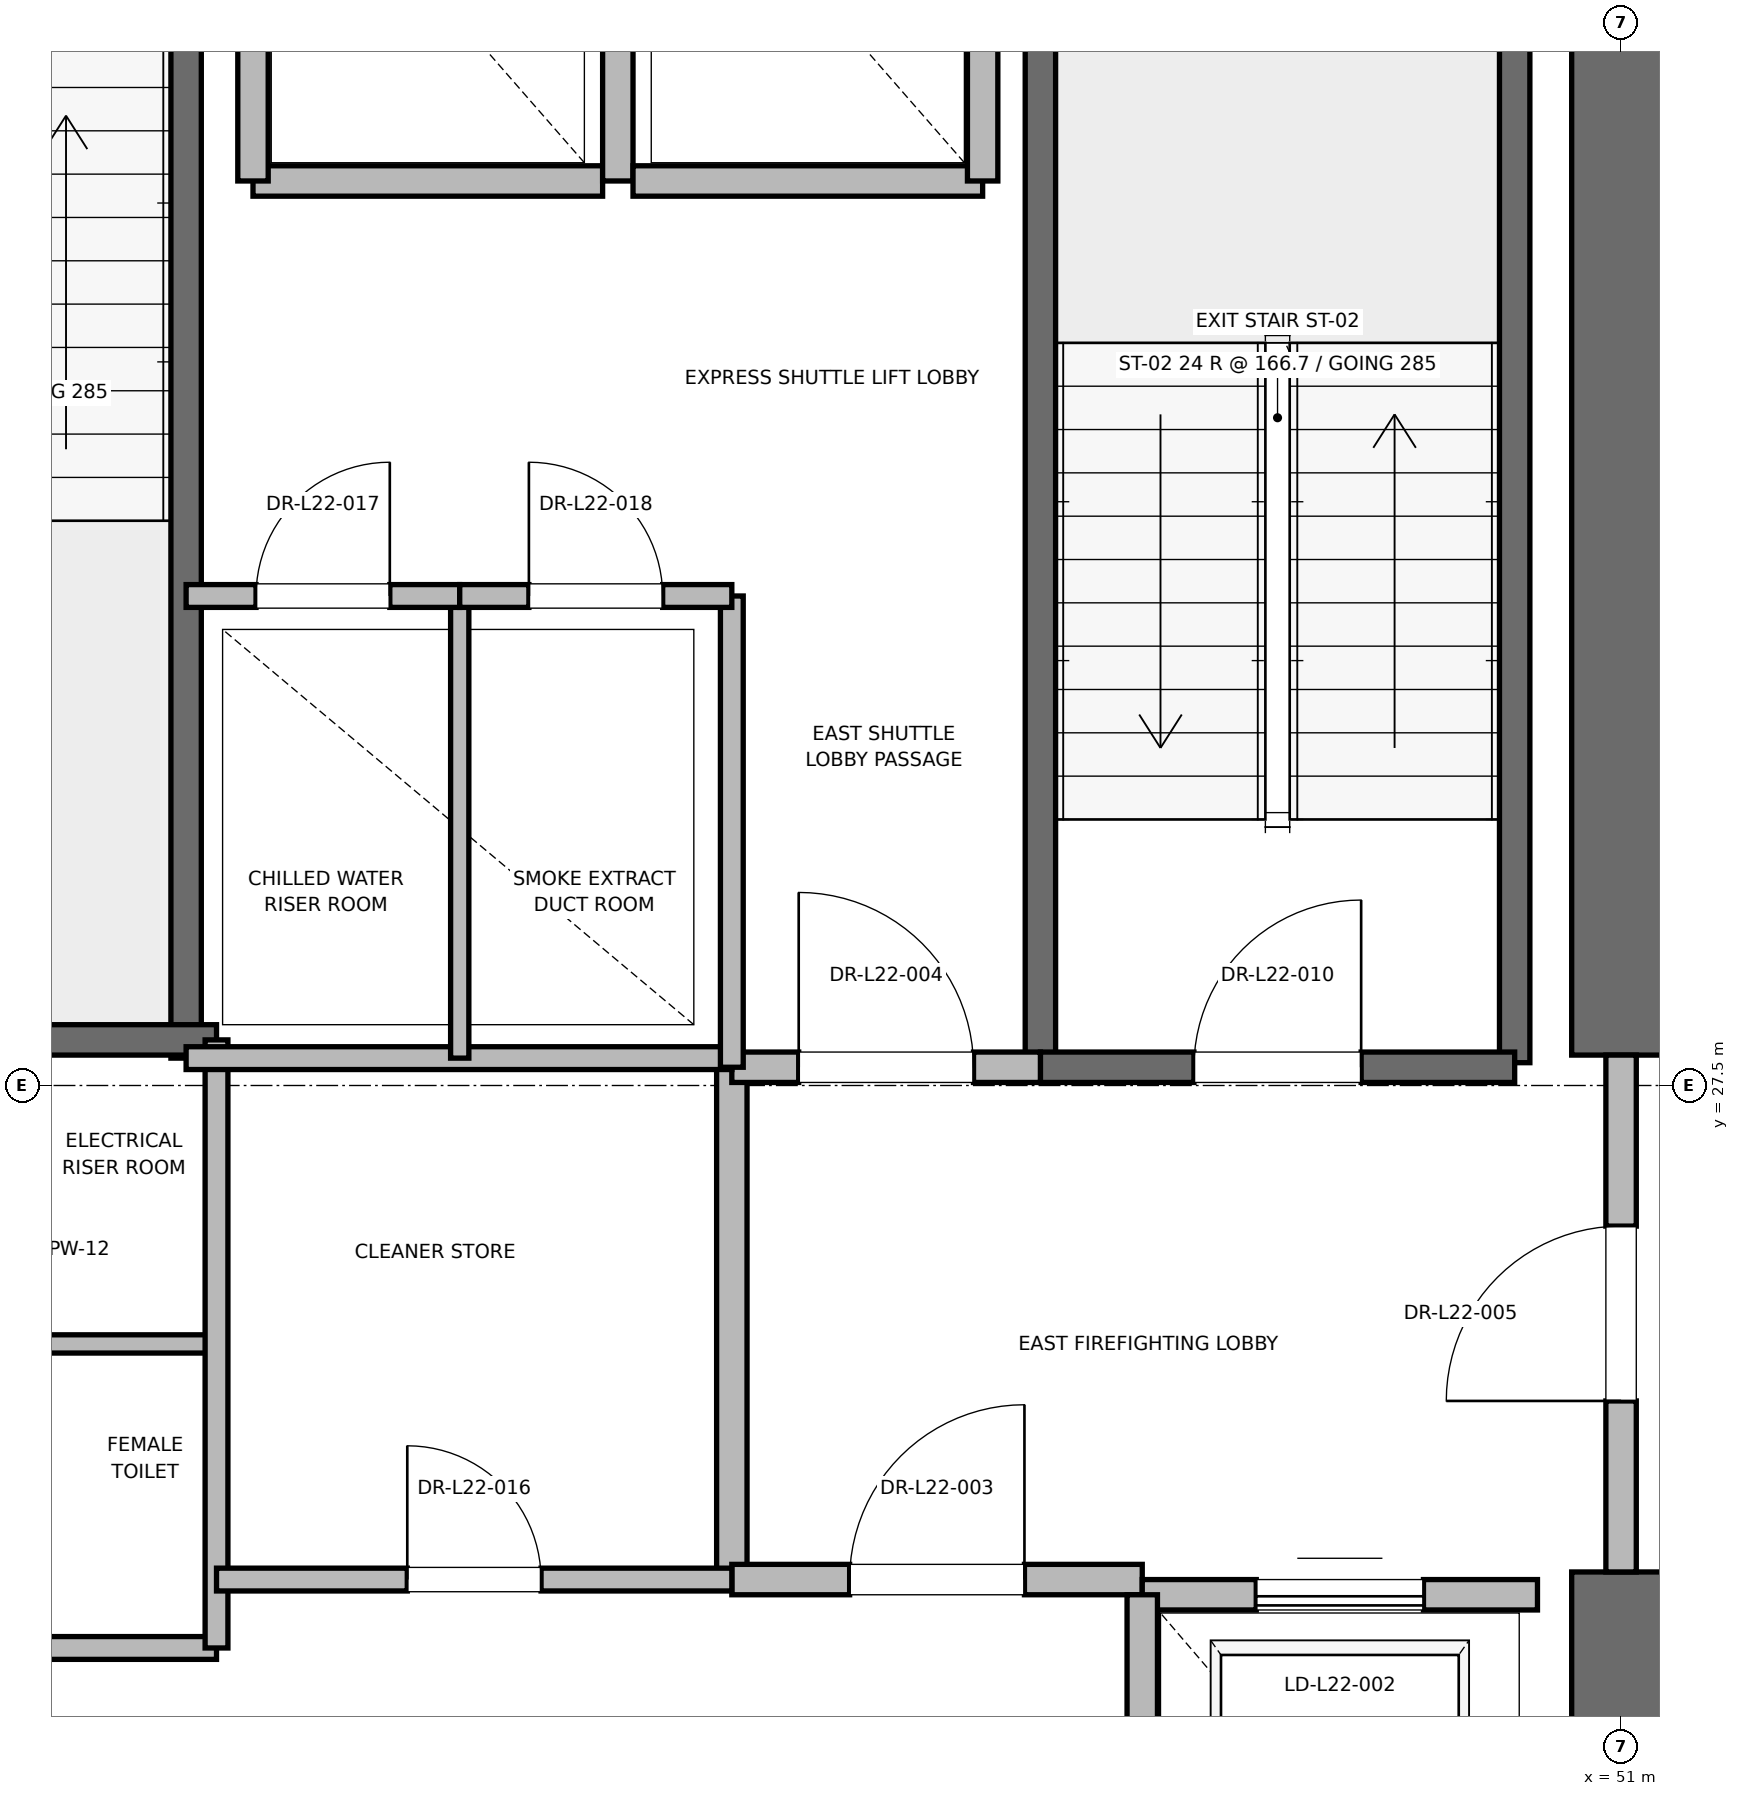
"""IFC4 building model, lengths in metres.
Left out: names, types, materials, properties, quantities, classifications, styles, units other than length and angle.
Written with IfcOpenShell. Run it as: python <this file> out.ifc"""

import sys

from ifc_helpers import new_model, si_unit, direction, frame, frame_2d, origin, place, context, subcontext, project, spatial, rectangle, extrude, element, fill, save


model = new_model("IFC4")
c1 = context("Model", 3, precision=1e-05, world=origin(), true_north=direction((0.0, 1.0)))
c2 = subcontext(c1, "Body", "Model", "MODEL_VIEW")
j1 = project(units=[si_unit("LENGTHUNIT", "METRE"), si_unit("PLANEANGLEUNIT", "RADIAN")], contexts=[c1])
p1 = place(None, origin())
s1 = spatial("IfcSite", under=j1, at=p1, CompositionType="ELEMENT")
p2 = place(p1, origin())
s2 = spatial("IfcBuilding", under=s1, at=p2, CompositionType="ELEMENT")
p3 = place(p2, frame((0.0, 0.0, 95.6)))
s3 = spatial("IfcBuildingStorey", under=s2, at=p3, CompositionType="ELEMENT", Elevation=95.6)
p4 = place(p3, frame((51.0, 18.5, 0.0), z_axis=(0.0, 0.0, 1.0), x_axis=(0.0, 1.0, 0.0)))
e1 = element("IfcWall", 1, at=p4, inside=s3, PredefinedType="SHEAR", context=c2, shape_type="SweptSolid", body=[
    extrude(rectangle(XDim=5.8, YDim=0.65, at=frame_2d((2.9, 0.0))), origin(), (0.0, 0.0, 1.0), 3.76),
])
p5 = place(p3, frame((51.0, 27.7, 0.0), z_axis=(0.0, 0.0, 1.0), x_axis=(0.0, 1.0, 0.0)))
e2 = element("IfcWall", 2, at=p5, inside=s3, PredefinedType="SHEAR", context=c2, shape_type="SweptSolid", body=[
    extrude(rectangle(XDim=8.8, YDim=0.65, at=frame_2d((4.4, 0.0))), origin(), (0.0, 0.0, 1.0), 3.76),
])
p6 = place(p3, frame((50.3, 27.65, 0.0), z_axis=(0.0, 0.0, 1.0), x_axis=(0.0, 1.0, 0.0)))
e3 = element("IfcWall", 3, at=p6, inside=s3, PredefinedType="SOLIDWALL", context=c2, shape_type="SweptSolid", body=[
    extrude(rectangle(XDim=8.15, YDim=0.2, at=frame_2d((4.075, 0.0))), origin(), (0.0, 0.0, 1.0), 3.76),
])
p7 = place(p3, frame((47.18, 27.62, 0.0), z_axis=(0.0, 0.0, 1.0), x_axis=(0.0, 1.0, 0.0)))
e4 = element("IfcWall", 4, at=p7, inside=s3, PredefinedType="SOLIDWALL", context=c2, shape_type="SweptSolid", body=[
    extrude(rectangle(XDim=8.18, YDim=0.2, at=frame_2d((4.09, 0.0))), origin(), (0.0, 0.0, 1.0), 3.76),
])
p8 = place(p3, frame((47.18, 27.62, 0.0), z_axis=(0.0, 0.0, 1.0), x_axis=(1.0, 0.0, 0.0)))
e5 = element("IfcWall", 5, at=p8, inside=s3, PredefinedType="SOLIDWALL", context=c2, shape_type="SweptSolid", body=[
    extrude(rectangle(XDim=3.12, YDim=0.2, at=frame_2d((1.56, 0.0))), origin(), (0.0, 0.0, 1.0), 3.76),
])
p9 = place(p8, frame((1.01, 0.0, 0.0)))
e6 = element("IfcOpeningElement", 6, at=p9, cuts=e5, PredefinedType="OPENING", context=c2, shape_type="SweptSolid", body=[
    extrude(rectangle(XDim=1.1, YDim=2.15, at=frame_2d((0.55, 1.075))), frame((0.0, 0.1, 0.0), z_axis=(0.0, -1.0, 0.0), x_axis=(1.0, 0.0, 0.0)), (0.0, 0.0, 1.0), 0.2),
])
p10 = place(p3, frame((41.56, 27.68, 0.0), z_axis=(0.0, 0.0, 1.0), x_axis=(0.0, 1.0, 0.0)))
e7 = element("IfcWall", 7, at=p10, inside=s3, PredefinedType="SOLIDWALL", context=c2, shape_type="SweptSolid", body=[
    extrude(rectangle(XDim=8.57, YDim=0.2, at=frame_2d((4.285, 0.0))), origin(), (0.0, 0.0, 1.0), 3.76),
])
p11 = place(p3, frame((38.44, 27.8, 0.0), z_axis=(0.0, 0.0, 1.0), x_axis=(1.0, 0.0, 0.0)))
e8 = element("IfcWall", 8, at=p11, inside=s3, PredefinedType="SOLIDWALL", context=c2, shape_type="SweptSolid", body=[
    extrude(rectangle(XDim=3.32, YDim=0.2, at=frame_2d((1.66, 0.0))), origin(), (0.0, 0.0, 1.0), 3.76),
])
p12 = place(p3, frame((45.15, 24.25, 0.0), z_axis=(0.0, 0.0, 1.0), x_axis=(0.0, 1.0, 0.0)))
e9 = element("IfcWall", 9, at=p12, inside=s3, PredefinedType="PARTITIONING", context=c2, shape_type="SweptSolid", body=[
    extrude(rectangle(XDim=3.37, YDim=0.2, at=frame_2d((1.685, 0.0))), origin(), (0.0, 0.0, 1.0), 3.76),
])
p13 = place(p3, frame((45.15, 24.25, 0.0), z_axis=(0.0, 0.0, 1.0), x_axis=(1.0, 0.0, 0.0)))
e10 = element("IfcWall", 10, at=p13, inside=s3, PredefinedType="PARTITIONING", context=c2, shape_type="SweptSolid", body=[
    extrude(rectangle(XDim=2.7, YDim=0.2, at=frame_2d((1.35, 0.0))), origin(), (0.0, 0.0, 1.0), 3.76),
])
p14 = place(p13, frame((0.775, 0.0, 0.0)))
e11 = element("IfcOpeningElement", 11, at=p14, cuts=e10, PredefinedType="OPENING", context=c2, shape_type="SweptSolid", body=[
    extrude(rectangle(XDim=1.15, YDim=2.2, at=frame_2d((0.575, 1.1))), frame((0.0, 0.1, 0.0), z_axis=(0.0, -1.0, 0.0), x_axis=(1.0, 0.0, 0.0)), (0.0, 0.0, 1.0), 0.2),
])
p15 = place(p3, frame((45.15, 27.62, 0.0), z_axis=(0.0, 0.0, 1.0), x_axis=(1.0, 0.0, 0.0)))
e12 = element("IfcWall", 12, at=p15, inside=s3, PredefinedType="PARTITIONING", context=c2, shape_type="SweptSolid", body=[
    extrude(rectangle(XDim=2.03, YDim=0.2, at=frame_2d((1.015, 0.0))), origin(), (0.0, 0.0, 1.0), 3.76),
])
p16 = place(p15, frame((0.44, 0.0, 0.0)))
e13 = element("IfcOpeningElement", 13, at=p16, cuts=e12, PredefinedType="OPENING", context=c2, shape_type="SweptSolid", body=[
    extrude(rectangle(XDim=1.15, YDim=2.2, at=frame_2d((0.575, 1.1))), frame((0.0, 0.1, 0.0), z_axis=(0.0, -1.0, 0.0), x_axis=(1.0, 0.0, 0.0)), (0.0, 0.0, 1.0), 0.2),
])
p17 = place(p3, frame((51.0, 24.3, 0.0), z_axis=(0.0, 0.0, 1.0), x_axis=(0.0, 1.0, 0.0)))
e14 = element("IfcWall", 14, at=p17, inside=s3, PredefinedType="PARTITIONING", context=c2, shape_type="SweptSolid", body=[
    extrude(rectangle(XDim=3.4, YDim=0.2, at=frame_2d((1.7, 0.0))), origin(), (0.0, 0.0, 1.0), 2.54),
])
p18 = place(p17, frame((1.125, 0.0, 0.0)))
e15 = element("IfcOpeningElement", 15, at=p18, cuts=e14, PredefinedType="OPENING", context=c2, shape_type="SweptSolid", body=[
    extrude(rectangle(XDim=1.15, YDim=2.2, at=frame_2d((0.575, 1.1))), frame((0.0, 0.1, 0.0), z_axis=(0.0, -1.0, 0.0), x_axis=(1.0, 0.0, 0.0)), (0.0, 0.0, 1.0), 0.2),
])
p19 = place(p3, frame((50.45, 24.15, 0.0), z_axis=(0.0, 0.0, 1.0), x_axis=(-1.0, 0.0, 0.0)))
e16 = element("IfcWall", 16, at=p19, inside=s3, PredefinedType="SOLIDWALL", context=c2, shape_type="SweptSolid", body=[
    extrude(rectangle(XDim=2.6, YDim=0.2, at=frame_2d((1.3, 0.0))), origin(), (0.0, 0.0, 1.0), 2.54),
])
p20 = place(p19, frame((0.75, 0.0, 0.0)))
e17 = element("IfcOpeningElement", 17, at=p20, cuts=e16, PredefinedType="OPENING", context=c2, shape_type="SweptSolid", body=[
    extrude(rectangle(XDim=1.1, YDim=2.2, at=frame_2d((0.55, 1.1))), frame((0.0, 0.1, 0.0), z_axis=(0.0, -1.0, 0.0), x_axis=(1.0, 0.0, 0.0)), (0.0, 0.0, 1.0), 0.2),
])
p21 = place(p3, frame((47.85, 24.15, 0.0), z_axis=(0.0, 0.0, 1.0), x_axis=(0.0, -1.0, 0.0)))
e18 = element("IfcWall", 18, at=p21, inside=s3, PredefinedType="SOLIDWALL", context=c2, shape_type="SweptSolid", body=[
    extrude(rectangle(XDim=3.0, YDim=0.2, at=frame_2d((1.5, 0.0))), origin(), (0.0, 0.0, 1.0), 3.76),
])
p22 = place(p3, frame((42.0, 33.45, 0.0), z_axis=(0.0, 0.0, 1.0), x_axis=(1.0, 0.0, 0.0)))
e19 = element("IfcWall", 19, at=p22, inside=s3, PredefinedType="SOLIDWALL", context=c2, shape_type="SweptSolid", body=[
    extrude(rectangle(XDim=2.3, YDim=0.2, at=frame_2d((1.15, 0.0))), origin(), (0.0, 0.0, 1.0), 3.76),
])
for number, where, z_axis, x_axis in (
    (20, (42.0, 36.05, 0.0), (0.0, 0.0, 1.0), (0.0, -1.0, 0.0)),
    (21, (44.4, 33.45, 0.0), (0.0, 0.0, 1.0), (0.0, 1.0, 0.0)),
):
    element("IfcWall", number, at=place(p3, frame(where, z_axis=z_axis, x_axis=x_axis)), inside=s3, PredefinedType="SOLIDWALL", context=c2, shape_type="SweptSolid", body=[
        extrude(rectangle(XDim=2.6, YDim=0.2, at=frame_2d((1.3, 0.0))), origin(), (0.0, 0.0, 1.0), 2.54),
    ])
p23 = place(p3, frame((44.5, 33.45, 0.0), z_axis=(0.0, 0.0, 1.0), x_axis=(1.0, 0.0, 0.0)))
e22 = element("IfcWall", 22, at=p23, inside=s3, PredefinedType="SOLIDWALL", context=c2, shape_type="SweptSolid", body=[
    extrude(rectangle(XDim=2.3, YDim=0.2, at=frame_2d((1.15, 0.0))), origin(), (0.0, 0.0, 1.0), 3.76),
])
p24 = place(p3, frame((46.8, 33.45, 0.0), z_axis=(0.0, 0.0, 1.0), x_axis=(0.0, 1.0, 0.0)))
e23 = element("IfcWall", 23, at=p24, inside=s3, PredefinedType="SOLIDWALL", context=c2, shape_type="SweptSolid", body=[
    extrude(rectangle(XDim=2.6, YDim=0.2, at=frame_2d((1.3, 0.0))), origin(), (0.0, 0.0, 1.0), 3.76),
])
p25 = place(p3, frame((39.95, 23.8, 0.0), z_axis=(0.0, 0.0, 1.0), x_axis=(1.0, 0.0, 0.0)))
e24 = element("IfcWall", 24, at=p25, inside=s3, PredefinedType="PARTITIONING", context=c2, shape_type="SweptSolid", body=[
    extrude(rectangle(XDim=1.81, YDim=0.15, at=frame_2d((0.905, 0.0))), origin(), (0.0, 0.0, 1.0), 2.85),
])
p26 = place(p3, frame((39.95, 25.8, 0.0), z_axis=(0.0, 0.0, 1.0), x_axis=(1.0, 0.0, 0.0)))
e25 = element("IfcWall", 25, at=p26, inside=s3, PredefinedType="PARTITIONING", context=c2, shape_type="SweptSolid", body=[
    extrude(rectangle(XDim=1.81, YDim=0.12, at=frame_2d((0.905, 0.0))), origin(), (0.0, 0.0, 1.0), 2.85),
])
p27 = place(p3, frame((41.76, 23.8, 0.0), z_axis=(0.0, 0.0, 1.0), x_axis=(0.0, 1.0, 0.0)))
e26 = element("IfcWall", 26, at=p27, inside=s3, PredefinedType="PARTITIONING", context=c2, shape_type="SweptSolid", body=[
    extrude(rectangle(XDim=4.0, YDim=0.15, at=frame_2d((2.0, 0.0))), origin(), (0.0, 0.0, 1.0), 2.85),
])
p28 = place(p3, frame((41.56, 27.68, 0.0), z_axis=(0.0, 0.0, 1.0), x_axis=(1.0, 0.0, 0.0)))
e27 = element("IfcWall", 27, at=p28, inside=s3, PredefinedType="PARTITIONING", context=c2, shape_type="SweptSolid", body=[
    extrude(rectangle(XDim=3.59, YDim=0.15, at=frame_2d((1.795, 0.0))), origin(), (0.0, 0.0, 1.0), 2.85),
])
p29 = place(p3, frame((41.76, 24.25, 0.0), z_axis=(0.0, 0.0, 1.0), x_axis=(1.0, 0.0, 0.0)))
e28 = element("IfcWall", 28, at=p29, inside=s3, PredefinedType="PARTITIONING", context=c2, shape_type="SweptSolid", body=[
    extrude(rectangle(XDim=3.39, YDim=0.15, at=frame_2d((1.695, 0.0))), origin(), (0.0, 0.0, 1.0), 2.85),
])
p30 = place(p29, frame((1.255, 0.0, 0.0)))
e29 = element("IfcOpeningElement", 29, at=p30, cuts=e28, PredefinedType="OPENING", context=c2, shape_type="SweptSolid", body=[
    extrude(rectangle(XDim=0.88, YDim=2.1, at=frame_2d((0.44, 1.05))), frame((0.0, 0.075, 0.0), z_axis=(0.0, -1.0, 0.0), x_axis=(1.0, 0.0, 0.0)), (0.0, 0.0, 1.0), 0.15),
])
p31 = place(p3, frame((45.15, 27.62, 0.0), z_axis=(0.0, 0.0, 1.0), x_axis=(0.0, 1.0, 0.0)))
e30 = element("IfcWall", 30, at=p31, inside=s3, PredefinedType="PARTITIONING", context=c2, shape_type="SweptSolid", body=[
    extrude(rectangle(XDim=3.1, YDim=0.15, at=frame_2d((1.55, 0.0))), origin(), (0.0, 0.0, 1.0), 2.85),
])
p32 = place(p3, frame((43.36, 27.68, 0.0), z_axis=(0.0, 0.0, 1.0), x_axis=(0.0, 1.0, 0.0)))
e31 = element("IfcWall", 31, at=p32, inside=s3, PredefinedType="PARTITIONING", context=c2, shape_type="SweptSolid", body=[
    extrude(rectangle(XDim=3.04, YDim=0.12, at=frame_2d((1.52, 0.0))), origin(), (0.0, 0.0, 1.0), 2.85),
])
p33 = place(p3, frame((41.56, 30.72, 0.0), z_axis=(0.0, 0.0, 1.0), x_axis=(1.0, 0.0, 0.0)))
e32 = element("IfcWall", 32, at=p33, inside=s3, PredefinedType="PARTITIONING", context=c2, shape_type="SweptSolid", body=[
    extrude(rectangle(XDim=1.8, YDim=0.15, at=frame_2d((0.9, 0.0))), origin(), (0.0, 0.0, 1.0), 2.85),
])
p34 = place(p33, frame((0.46, 0.0, 0.0)))
e33 = element("IfcOpeningElement", 33, at=p34, cuts=e32, PredefinedType="OPENING", context=c2, shape_type="SweptSolid", body=[
    extrude(rectangle(XDim=0.88, YDim=2.1, at=frame_2d((0.44, 1.05))), frame((0.0, 0.075, 0.0), z_axis=(0.0, -1.0, 0.0), x_axis=(1.0, 0.0, 0.0)), (0.0, 0.0, 1.0), 0.15),
])
p35 = place(p3, frame((43.36, 30.72, 0.0), z_axis=(0.0, 0.0, 1.0), x_axis=(1.0, 0.0, 0.0)))
e34 = element("IfcWall", 34, at=p35, inside=s3, PredefinedType="PARTITIONING", context=c2, shape_type="SweptSolid", body=[
    extrude(rectangle(XDim=1.79, YDim=0.15, at=frame_2d((0.895, 0.0))), origin(), (0.0, 0.0, 1.0), 2.85),
])
p36 = place(p35, frame((0.455, 0.0, 0.0)))
e35 = element("IfcOpeningElement", 35, at=p36, cuts=e34, PredefinedType="OPENING", context=c2, shape_type="SweptSolid", body=[
    extrude(rectangle(XDim=0.88, YDim=2.1, at=frame_2d((0.44, 1.05))), frame((0.0, 0.075, 0.0), z_axis=(0.0, -1.0, 0.0), x_axis=(1.0, 0.0, 0.0)), (0.0, 0.0, 1.0), 0.15),
])
p37 = place(p9, origin())
e36 = element("IfcDoor", 36, at=p37, inside=s3, OperationType="SINGLE_SWING_RIGHT", PredefinedType="DOOR", context=c2, shape_type="SweptSolid", body=[
    extrude(rectangle(XDim=1.1, YDim=2.15, at=frame_2d((0.55, 1.075))), frame((0.0, 0.025, 0.0), z_axis=(0.0, -1.0, 0.0), x_axis=(1.0, 0.0, 0.0)), (0.0, 0.0, 1.0), 0.05),
])
fill(e6, e36)
p38 = place(p14, origin())
e37 = element("IfcDoor", 37, at=p38, inside=s3, OperationType="SINGLE_SWING_RIGHT", PredefinedType="DOOR", context=c2, shape_type="SweptSolid", body=[
    extrude(rectangle(XDim=1.15, YDim=2.2, at=frame_2d((0.575, 1.1))), frame((0.0, 0.025, 0.0), z_axis=(0.0, -1.0, 0.0), x_axis=(1.0, 0.0, 0.0)), (0.0, 0.0, 1.0), 0.05),
])
fill(e11, e37)
p39 = place(p16, origin())
e38 = element("IfcDoor", 38, at=p39, inside=s3, OperationType="SINGLE_SWING_LEFT", PredefinedType="DOOR", context=c2, shape_type="SweptSolid", body=[
    extrude(rectangle(XDim=1.15, YDim=2.2, at=frame_2d((0.575, 1.1))), frame((0.0, 0.025, 0.0), z_axis=(0.0, -1.0, 0.0), x_axis=(1.0, 0.0, 0.0)), (0.0, 0.0, 1.0), 0.05),
])
fill(e13, e38)
p40 = place(p18, origin())
e39 = element("IfcDoor", 39, at=p40, inside=s3, OperationType="SINGLE_SWING_LEFT", PredefinedType="DOOR", context=c2, shape_type="SweptSolid", body=[
    extrude(rectangle(XDim=1.15, YDim=2.2, at=frame_2d((0.575, 1.1))), frame((0.0, 0.025, 0.0), z_axis=(0.0, -1.0, 0.0), x_axis=(1.0, 0.0, 0.0)), (0.0, 0.0, 1.0), 0.05),
])
fill(e15, e39)
p41 = place(p20, origin())
e40 = element("IfcDoor", 40, at=p41, inside=s3, OperationType="SLIDING_TO_RIGHT", PredefinedType="DOOR", context=c2, shape_type="SweptSolid", body=[
    extrude(rectangle(XDim=1.1, YDim=2.2, at=frame_2d((0.55, 1.1))), frame((0.0, 0.025, 0.0), z_axis=(0.0, -1.0, 0.0), x_axis=(1.0, 0.0, 0.0)), (0.0, 0.0, 1.0), 0.05),
])
fill(e17, e40)
p42 = place(p30, origin())
e41 = element("IfcDoor", 41, at=p42, inside=s3, OperationType="SINGLE_SWING_LEFT", PredefinedType="DOOR", context=c2, shape_type="SweptSolid", body=[
    extrude(rectangle(XDim=0.88, YDim=2.1, at=frame_2d((0.44, 1.05))), frame((0.0, 0.025, 0.0), z_axis=(0.0, -1.0, 0.0), x_axis=(1.0, 0.0, 0.0)), (0.0, 0.0, 1.0), 0.05),
])
fill(e29, e41)
p43 = place(p34, origin())
e42 = element("IfcDoor", 42, at=p43, inside=s3, OperationType="SINGLE_SWING_RIGHT", PredefinedType="DOOR", context=c2, shape_type="SweptSolid", body=[
    extrude(rectangle(XDim=0.88, YDim=2.1, at=frame_2d((0.44, 1.05))), frame((0.0, 0.025, 0.0), z_axis=(0.0, -1.0, 0.0), x_axis=(1.0, 0.0, 0.0)), (0.0, 0.0, 1.0), 0.05),
])
fill(e33, e42)
p44 = place(p36, origin())
e43 = element("IfcDoor", 43, at=p44, inside=s3, OperationType="SINGLE_SWING_LEFT", PredefinedType="DOOR", context=c2, shape_type="SweptSolid", body=[
    extrude(rectangle(XDim=0.88, YDim=2.1, at=frame_2d((0.44, 1.05))), frame((0.0, 0.025, 0.0), z_axis=(0.0, -1.0, 0.0), x_axis=(1.0, 0.0, 0.0)), (0.0, 0.0, 1.0), 0.05),
])
fill(e35, e43)
save(model, sys.argv[1])
